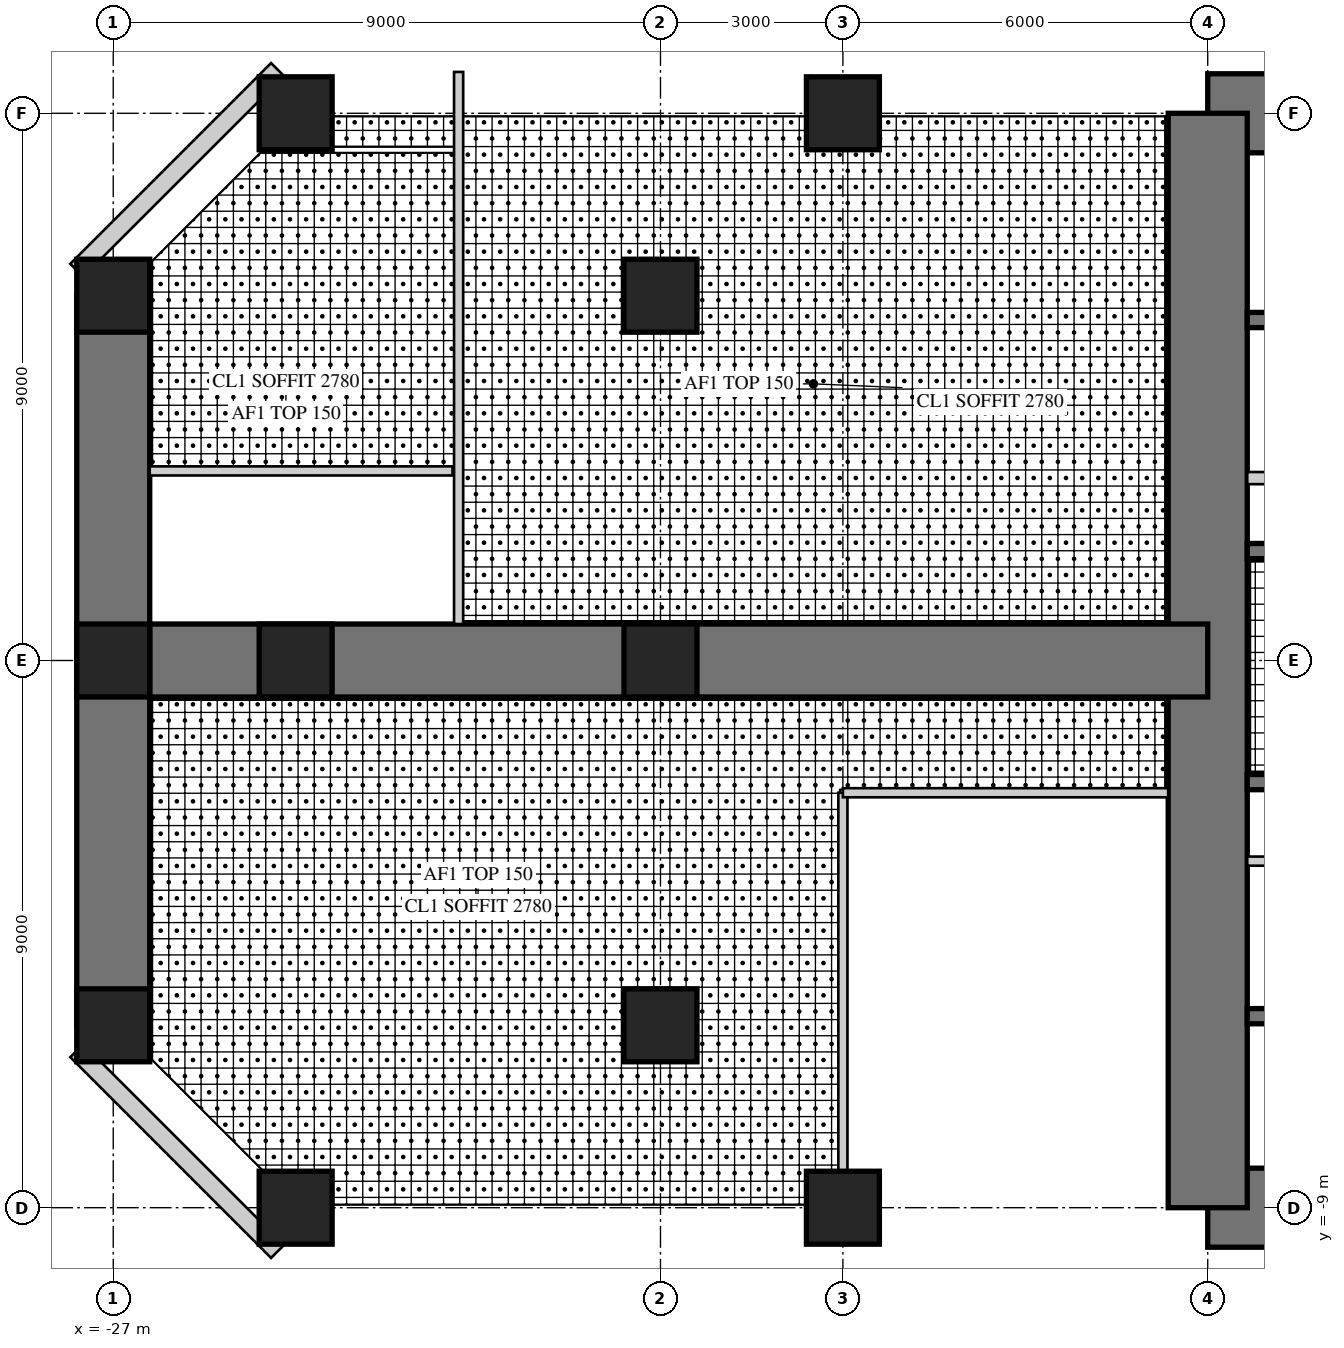
"""IFC4 building model, lengths in metres.
Left out: names, types, materials, properties, quantities, classifications, styles, units other than length and angle.
Written with IfcOpenShell. Run it as: python <this file> out.ifc"""

import sys

from ifc_helpers import new_model, si_unit, direction, frame, frame_2d, origin, origin_2d, place, context, subcontext, project, spatial, rectangle, hollow_rectangle, extrude, element, fill, save


model = new_model("IFC4")
c1 = context("Model", 3, precision=1e-05, world=origin(), true_north=direction((0.0, 1.0)))
c2 = subcontext(c1, "Body", "Model", "MODEL_VIEW")
j1 = project(units=[si_unit("LENGTHUNIT", "METRE"), si_unit("PLANEANGLEUNIT", "RADIAN")], contexts=[c1])
p1 = place(None, origin())
s1 = spatial("IfcSite", under=j1, at=p1, CompositionType="ELEMENT")
p2 = place(p1, origin())
s2 = spatial("IfcBuilding", under=s1, at=p2, CompositionType="ELEMENT")
p3 = place(p2, frame((0.0, 0.0, 71.5)))
s3 = spatial("IfcBuildingStorey", under=s2, at=p3, CompositionType="ELEMENT", Elevation=71.5)
p4 = place(p3, frame((9.0, 9.0, 0.0), z_axis=(0.0, 0.0, 1.0), x_axis=(-1.0, 0.0, 0.0)))
e1 = element("IfcWall", 1, at=p4, inside=s3, PredefinedType="SHEAR", context=c2, shape_type="SweptSolid", body=[
    extrude(rectangle(XDim=18.0, YDim=1.3, at=frame_2d((9.0, 0.0))), origin(), (0.0, 0.0, 1.0), 4.0),
])
p5 = place(p4, frame((9.8, 0.0, 0.0)))
e2 = element("IfcOpeningElement", 2, at=p5, cuts=e1, PredefinedType="OPENING", context=c2, shape_type="SweptSolid", body=[
    extrude(rectangle(XDim=1.0, YDim=2.4, at=frame_2d((0.5, 1.2))), frame((0.0, 0.66, 0.0), z_axis=(0.0, -1.0, 0.0), x_axis=(1.0, 0.0, 0.0)), (0.0, 0.0, 1.0), 1.32),
])
p6 = place(p3, frame((-9.0, -9.0, 0.0), z_axis=(0.0, 0.0, 1.0), x_axis=(1.0, 0.0, 0.0)))
e3 = element("IfcWall", 3, at=p6, inside=s3, PredefinedType="SHEAR", context=c2, shape_type="SweptSolid", body=[
    extrude(rectangle(XDim=18.0, YDim=1.3, at=frame_2d((9.0, 0.0))), origin(), (0.0, 0.0, 1.0), 4.0),
])
p7 = place(p6, frame((9.8, 0.0, 0.0)))
e4 = element("IfcOpeningElement", 4, at=p7, cuts=e3, PredefinedType="OPENING", context=c2, shape_type="SweptSolid", body=[
    extrude(rectangle(XDim=1.0, YDim=2.4, at=frame_2d((0.5, 1.2))), frame((0.0, 0.66, 0.0), z_axis=(0.0, -1.0, 0.0), x_axis=(1.0, 0.0, 0.0)), (0.0, 0.0, 1.0), 1.32),
])
p8 = place(p3, frame((-9.0, 9.0, 0.0), z_axis=(0.0, 0.0, 1.0), x_axis=(0.0, -1.0, 0.0)))
e5 = element("IfcWall", 5, at=p8, inside=s3, PredefinedType="SHEAR", context=c2, shape_type="SweptSolid", body=[
    extrude(rectangle(XDim=18.0, YDim=1.3, at=frame_2d((9.0, 0.0))), origin(), (0.0, 0.0, 1.0), 4.0),
])
p9 = place(p8, frame((9.8, 0.0, 0.0)))
e6 = element("IfcOpeningElement", 6, at=p9, cuts=e5, PredefinedType="OPENING", context=c2, shape_type="SweptSolid", body=[
    extrude(rectangle(XDim=1.0, YDim=2.4, at=frame_2d((0.5, 1.2))), frame((0.0, 0.66, 0.0), z_axis=(0.0, -1.0, 0.0), x_axis=(1.0, 0.0, 0.0)), (0.0, 0.0, 1.0), 1.32),
])
p10 = place(p3, frame((-2.125, 1.8, 0.0), z_axis=(0.0, 0.0, 1.0), x_axis=(-1.0, 0.0, 0.0)))
e7 = element("IfcWall", 7, at=p10, inside=s3, PredefinedType="SHEAR", context=c2, shape_type="SweptSolid", body=[
    extrude(rectangle(XDim=6.225, YDim=0.25, at=frame_2d((3.113, 0.0))), origin(), (0.0, 0.0, 1.0), 4.0),
])
p11 = place(p3, frame((-2.125, 5.6, 0.0), z_axis=(0.0, 0.0, 1.0), x_axis=(-1.0, 0.0, 0.0)))
e8 = element("IfcWall", 8, at=p11, inside=s3, PredefinedType="SHEAR", context=c2, shape_type="SweptSolid", body=[
    extrude(rectangle(XDim=6.225, YDim=0.25, at=frame_2d((3.113, 0.0))), origin(), (0.0, 0.0, 1.0), 4.0),
])
p12 = place(p11, frame((0.175, 0.0, 0.0)))
e9 = element("IfcOpeningElement", 9, at=p12, cuts=e8, PredefinedType="OPENING", context=c2, shape_type="SweptSolid", body=[
    extrude(rectangle(XDim=1.0, YDim=2.1, at=frame_2d((0.5, 1.05))), frame((0.0, 0.135, 0.0), z_axis=(0.0, -1.0, 0.0), x_axis=(1.0, 0.0, 0.0)), (0.0, 0.0, 1.0), 0.27),
])
p13 = place(p3, frame((-5.725, 3.0, 0.0), z_axis=(0.0, 0.0, 1.0), x_axis=(-1.0, 0.0, 0.0)))
e10 = element("IfcWall", 10, at=p13, inside=s3, PredefinedType="PARTITIONING", context=c2, shape_type="SweptSolid", body=[
    extrude(rectangle(XDim=2.625, YDim=0.2, at=frame_2d((1.312, 0.0))), origin(), (0.0, 0.0, 1.0), 4.0),
])
for number, where, z_axis, x_axis in (
    (11, (-1.925, -2.0, 0.0), (0.0, 0.0, 1.0), (-1.0, 0.0, 0.0)),
    (12, (-1.925, -5.85, 0.0), (0.0, 0.0, 1.0), (-1.0, 0.0, 0.0)),
):
    element("IfcWall", number, at=place(p3, frame(where, z_axis=z_axis, x_axis=x_axis)), inside=s3, PredefinedType="SHEAR", context=c2, shape_type="SweptSolid", body=[
        extrude(rectangle(XDim=6.425, YDim=0.25, at=frame_2d((3.212, 0.0))), origin(), (0.0, 0.0, 1.0), 4.0),
    ])
p14 = place(p3, frame((-1.925, -3.3, 0.0), z_axis=(0.0, 0.0, 1.0), x_axis=(-1.0, 0.0, 0.0)))
e13 = element("IfcWall", 13, at=p14, inside=s3, PredefinedType="PARTITIONING", context=c2, shape_type="SweptSolid", body=[
    extrude(rectangle(XDim=6.425, YDim=0.15, at=frame_2d((3.212, 0.0))), origin(), (0.0, 0.0, 1.0), 4.0),
])
p15 = place(p14, frame((0.075, 0.0, 0.0)))
e14 = element("IfcOpeningElement", 14, at=p15, cuts=e13, PredefinedType="OPENING", context=c2, shape_type="SweptSolid", body=[
    extrude(rectangle(XDim=0.8, YDim=2.1, at=frame_2d((0.4, 1.05))), frame((0.0, 0.085, 0.0), z_axis=(0.0, -1.0, 0.0), x_axis=(1.0, 0.0, 0.0)), (0.0, 0.0, 1.0), 0.17),
])
p16 = place(p14, frame((3.675, 0.0, 0.0)))
e15 = element("IfcOpeningElement", 15, at=p16, cuts=e13, PredefinedType="OPENING", context=c2, shape_type="SweptSolid", body=[
    extrude(rectangle(XDim=0.8, YDim=2.1, at=frame_2d((0.4, 1.05))), frame((0.0, 0.085, 0.0), z_axis=(0.0, -1.0, 0.0), x_axis=(1.0, 0.0, 0.0)), (0.0, 0.0, 1.0), 0.17),
])
p17 = place(p3, frame((-9.0, 0.0, 0.0), z_axis=(0.0, 0.0, 1.0), x_axis=(-1.0, 0.0, 0.0)))
e16 = element("IfcWall", 16, at=p17, inside=s3, PredefinedType="SHEAR", context=c2, shape_type="SweptSolid", body=[
    extrude(rectangle(XDim=18.0, YDim=1.2, at=frame_2d((9.0, 0.0))), origin(), (0.0, 0.0, 1.0), 4.0),
])
p18 = place(p17, frame((9.9, 0.0, 0.0)))
e17 = element("IfcOpeningElement", 17, at=p18, cuts=e16, PredefinedType="OPENING", context=c2, shape_type="SweptSolid", body=[
    extrude(rectangle(XDim=1.0, YDim=2.2, at=frame_2d((0.5, 1.1))), frame((0.0, 0.61, 0.0), z_axis=(0.0, -1.0, 0.0), x_axis=(1.0, 0.0, 0.0)), (0.0, 0.0, 1.0), 1.22),
])
p19 = place(p3, frame((-27.0, 6.0, 0.0), z_axis=(0.0, 0.0, 1.0), x_axis=(0.0, -1.0, 0.0)))
e18 = element("IfcWall", 18, at=p19, inside=s3, PredefinedType="SHEAR", context=c2, shape_type="SweptSolid", body=[
    extrude(rectangle(XDim=12.0, YDim=1.2, at=frame_2d((6.0, 0.0))), origin(), (0.0, 0.0, 1.0), 4.0),
])
p20 = place(p19, frame((1.6, 0.0, 0.6)))
e19 = element("IfcOpeningElement", 19, at=p20, cuts=e18, PredefinedType="OPENING", context=c2, shape_type="SweptSolid", body=[
    extrude(rectangle(XDim=3.0, YDim=2.4, at=frame_2d((1.5, 1.2))), frame((0.0, 0.61, 0.0), z_axis=(0.0, -1.0, 0.0), x_axis=(1.0, 0.0, 0.0)), (0.0, 0.0, 1.0), 1.22),
])
p21 = place(p19, frame((7.4, 0.0, 0.6)))
e20 = element("IfcOpeningElement", 20, at=p21, cuts=e18, PredefinedType="OPENING", context=c2, shape_type="SweptSolid", body=[
    extrude(rectangle(XDim=3.0, YDim=2.4, at=frame_2d((1.5, 1.2))), frame((0.0, 0.61, 0.0), z_axis=(0.0, -1.0, 0.0), x_axis=(1.0, 0.0, 0.0)), (0.0, 0.0, 1.0), 1.22),
])
for number, where, z_axis, x_axis in (
    (21, (-15.0, 9.0, 0.0), (0.0, 0.0, 1.0), (1.0, 0.0, 0.0)),
    (22, (-24.0, 9.0, 0.0), (0.0, 0.0, 1.0), (1.0, 0.0, 0.0)),
    (23, (-15.0, -9.0, 0.0), (0.0, 0.0, 1.0), (1.0, 0.0, 0.0)),
    (24, (-24.0, -9.0, 0.0), (0.0, 0.0, 1.0), (1.0, 0.0, 0.0)),
    (25, (-27.0, 6.0, 0.0), (0.0, 0.0, 1.0), (1.0, 0.0, 0.0)),
    (26, (-27.0, 0.0, 0.0), (0.0, 0.0, 1.0), (1.0, 0.0, 0.0)),
    (27, (-27.0, -6.0, 0.0), (0.0, 0.0, 1.0), (1.0, 0.0, 0.0)),
    (28, (-18.0, 6.0, 0.0), (0.0, 0.0, 1.0), (1.0, 0.0, 0.0)),
    (29, (-18.0, 0.0, 0.0), (0.0, 0.0, 1.0), (1.0, 0.0, 0.0)),
    (30, (-18.0, -6.0, 0.0), (0.0, 0.0, 1.0), (1.0, 0.0, 0.0)),
    (31, (-24.0, 0.0, 0.0), (0.0, 0.0, 1.0), (1.0, 0.0, 0.0)),
):
    element("IfcColumn", number, at=place(p3, frame(where, z_axis=z_axis, x_axis=x_axis)), inside=s3, PredefinedType="COLUMN", context=c2, shape_type="SweptSolid", body=[
        extrude(rectangle(XDim=1.2, YDim=1.2, at=origin_2d()), origin(), (0.0, 0.0, 1.0), 4.0),
    ])
p22 = place(p3, frame((-24.298, 9.72, 0.0), z_axis=(0.0, 0.0, 1.0), x_axis=(-0.707106781187, -0.707106781187, 0.0)))
e32 = element("IfcWall", 32, at=p22, inside=s3, PredefinedType="SOLIDWALL", context=c2, shape_type="SweptSolid", body=[
    extrude(rectangle(XDim=4.669, YDim=0.3, at=frame_2d((2.335, 0.0))), origin(), (0.0, 0.0, 1.0), 3.8),
])
p23 = place(p22, frame((1.885, 0.0, 0.3)))
e33 = element("IfcOpeningElement", 33, at=p23, cuts=e32, PredefinedType="OPENING", context=c2, shape_type="SweptSolid", body=[
    extrude(rectangle(XDim=0.9, YDim=2.4, at=frame_2d((0.45, 1.2))), frame((0.0, 0.16, 0.0), z_axis=(0.0, -1.0, 0.0), x_axis=(1.0, 0.0, 0.0)), (0.0, 0.0, 1.0), 0.32),
])
p24 = place(p3, frame((-27.6, -6.418, 0.0), z_axis=(0.0, 0.0, 1.0), x_axis=(0.707106781187, -0.707106781187, 0.0)))
e34 = element("IfcWall", 34, at=p24, inside=s3, PredefinedType="SOLIDWALL", context=c2, shape_type="SweptSolid", body=[
    extrude(rectangle(XDim=4.669, YDim=0.3, at=frame_2d((2.335, 0.0))), origin(), (0.0, 0.0, 1.0), 3.8),
])
p25 = place(p24, frame((1.885, 0.0, 0.3)))
e35 = element("IfcOpeningElement", 35, at=p25, cuts=e34, PredefinedType="OPENING", context=c2, shape_type="SweptSolid", body=[
    extrude(rectangle(XDim=0.9, YDim=2.4, at=frame_2d((0.45, 1.2))), frame((0.0, 0.16, 0.0), z_axis=(0.0, -1.0, 0.0), x_axis=(1.0, 0.0, 0.0)), (0.0, 0.0, 1.0), 0.32),
])
p26 = place(p3, frame((-15.0, -2.175, 0.0), z_axis=(0.0, 0.0, 1.0), x_axis=(0.0, -1.0, 0.0)))
e36 = element("IfcWall", 36, at=p26, inside=s3, PredefinedType="PARTITIONING", context=c2, shape_type="SweptSolid", body=[
    extrude(rectangle(XDim=6.225, YDim=0.15, at=frame_2d((3.112, 0.0))), origin(), (0.0, 0.0, 1.0), 2.95),
])
p27 = place(p26, frame((2.613, 0.0, 0.0)))
e37 = element("IfcOpeningElement", 37, at=p27, cuts=e36, PredefinedType="OPENING", context=c2, shape_type="SweptSolid", body=[
    extrude(rectangle(XDim=1.0, YDim=2.1, at=frame_2d((0.5, 1.05))), frame((0.0, 0.085, 0.0), z_axis=(0.0, -1.0, 0.0), x_axis=(1.0, 0.0, 0.0)), (0.0, 0.0, 1.0), 0.17),
])
p28 = place(p3, frame((-9.65, -2.175, 0.0), z_axis=(0.0, 0.0, 1.0), x_axis=(-1.0, 0.0, 0.0)))
e38 = element("IfcWall", 38, at=p28, inside=s3, PredefinedType="PARTITIONING", context=c2, shape_type="SweptSolid", body=[
    extrude(rectangle(XDim=5.35, YDim=0.15, at=frame_2d((2.675, 0.0))), origin(), (0.0, 0.0, 1.0), 3.8),
])
p29 = place(p3, frame((-21.42, 3.118, 0.0), z_axis=(0.0, 0.0, 1.0), x_axis=(-1.0, 0.0, 0.0)))
e39 = element("IfcWall", 39, at=p29, inside=s3, PredefinedType="PARTITIONING", context=c2, shape_type="SweptSolid", body=[
    extrude(rectangle(XDim=4.98, YDim=0.15, at=frame_2d((2.49, 0.0))), origin(), (0.0, 0.0, 1.0), 3.8),
])
p30 = place(p3, frame((-21.32, 9.68, 0.0), z_axis=(0.0, 0.0, 1.0), x_axis=(0.0, -1.0, 0.0)))
e40 = element("IfcWall", 40, at=p30, inside=s3, PredefinedType="PARTITIONING", context=c2, shape_type="SweptSolid", body=[
    extrude(rectangle(XDim=9.08, YDim=0.15, at=frame_2d((4.54, 0.0))), origin(), (0.0, 0.0, 1.0), 3.8),
])
p31 = place(p30, frame((5.087, 0.0, 0.0)))
e41 = element("IfcOpeningElement", 41, at=p31, cuts=e40, PredefinedType="OPENING", context=c2, shape_type="SweptSolid", body=[
    extrude(rectangle(XDim=1.0, YDim=2.2, at=frame_2d((0.5, 1.1))), frame((0.0, 0.085, 0.0), z_axis=(0.0, -1.0, 0.0), x_axis=(1.0, 0.0, 0.0)), (0.0, 0.0, 1.0), 0.17),
])
p32 = place(p30, frame((7.73, 0.0, 0.0)))
e42 = element("IfcOpeningElement", 42, at=p32, cuts=e40, PredefinedType="OPENING", context=c2, shape_type="SweptSolid", body=[
    extrude(rectangle(XDim=1.0, YDim=2.2, at=frame_2d((0.5, 1.1))), frame((0.0, 0.085, 0.0), z_axis=(0.0, -1.0, 0.0), x_axis=(1.0, 0.0, 0.0)), (0.0, 0.0, 1.0), 0.17),
])
p33 = place(p23, origin())
e43 = element("IfcWindow", 43, at=p33, inside=s3, PartitioningType="SINGLE_PANEL", PredefinedType="WINDOW", context=c2, shape_type="SweptSolid", body=[
    extrude(hollow_rectangle(XDim=0.9, YDim=2.4, WallThickness=0.06, at=frame_2d((0.45, 1.2))), frame((0.0, 0.03, 0.0), z_axis=(0.0, -1.0, 0.0), x_axis=(1.0, 0.0, 0.0)), (0.0, 0.0, 1.0), 0.06),
    extrude(rectangle(XDim=0.779, YDim=2.279, at=frame_2d((0.45, 1.2))), frame((0.0, 0.03, 0.0), z_axis=(0.0, -1.0, 0.0), x_axis=(1.0, 0.0, 0.0)), (0.0, 0.0, 1.0), 0.06),
])
fill(e33, e43)
p34 = place(p20, origin())
e44 = element("IfcWindow", 44, at=p34, inside=s3, PartitioningType="SINGLE_PANEL", PredefinedType="WINDOW", context=c2, shape_type="SweptSolid", body=[
    extrude(hollow_rectangle(XDim=3.0, YDim=2.4, WallThickness=0.06, at=frame_2d((1.5, 1.2))), frame((0.0, 0.03, 0.0), z_axis=(0.0, -1.0, 0.0), x_axis=(1.0, 0.0, 0.0)), (0.0, 0.0, 1.0), 0.06),
    extrude(rectangle(XDim=2.879, YDim=2.279, at=frame_2d((1.5, 1.2))), frame((0.0, 0.03, 0.0), z_axis=(0.0, -1.0, 0.0), x_axis=(1.0, 0.0, 0.0)), (0.0, 0.0, 1.0), 0.06),
])
fill(e19, e44)
p35 = place(p21, origin())
e45 = element("IfcWindow", 45, at=p35, inside=s3, PartitioningType="SINGLE_PANEL", PredefinedType="WINDOW", context=c2, shape_type="SweptSolid", body=[
    extrude(hollow_rectangle(XDim=3.0, YDim=2.4, WallThickness=0.06, at=frame_2d((1.5, 1.2))), frame((0.0, 0.03, 0.0), z_axis=(0.0, -1.0, 0.0), x_axis=(1.0, 0.0, 0.0)), (0.0, 0.0, 1.0), 0.06),
    extrude(rectangle(XDim=2.879, YDim=2.279, at=frame_2d((1.5, 1.2))), frame((0.0, 0.03, 0.0), z_axis=(0.0, -1.0, 0.0), x_axis=(1.0, 0.0, 0.0)), (0.0, 0.0, 1.0), 0.06),
])
fill(e20, e45)
p36 = place(p25, origin())
e46 = element("IfcWindow", 46, at=p36, inside=s3, PartitioningType="SINGLE_PANEL", PredefinedType="WINDOW", context=c2, shape_type="SweptSolid", body=[
    extrude(hollow_rectangle(XDim=0.9, YDim=2.4, WallThickness=0.06, at=frame_2d((0.45, 1.2))), frame((0.0, 0.03, 0.0), z_axis=(0.0, -1.0, 0.0), x_axis=(1.0, 0.0, 0.0)), (0.0, 0.0, 1.0), 0.06),
    extrude(rectangle(XDim=0.779, YDim=2.279, at=frame_2d((0.45, 1.2))), frame((0.0, 0.03, 0.0), z_axis=(0.0, -1.0, 0.0), x_axis=(1.0, 0.0, 0.0)), (0.0, 0.0, 1.0), 0.06),
])
fill(e35, e46)
p37 = place(p27, origin())
e47 = element("IfcDoor", 47, at=p37, inside=s3, OperationType="SINGLE_SWING_LEFT", PredefinedType="DOOR", context=c2, shape_type="SweptSolid", body=[
    extrude(rectangle(XDim=1.0, YDim=2.1, at=frame_2d((0.5, 1.05))), frame((0.0, 0.025, 0.0), z_axis=(0.0, -1.0, 0.0), x_axis=(1.0, 0.0, 0.0)), (0.0, 0.0, 1.0), 0.05),
])
fill(e37, e47)
p38 = place(p31, frame((1.0, 0.0, 0.0), z_axis=(0.0, 0.0, 1.0), x_axis=(-1.0, 0.0, 0.0)))
e48 = element("IfcDoor", 48, at=p38, inside=s3, OperationType="SINGLE_SWING_LEFT", PredefinedType="DOOR", context=c2, shape_type="SweptSolid", body=[
    extrude(rectangle(XDim=1.0, YDim=2.2, at=frame_2d((0.5, 1.1))), frame((0.0, 0.025, 0.0), z_axis=(0.0, -1.0, 0.0), x_axis=(1.0, 0.0, 0.0)), (0.0, 0.0, 1.0), 0.05),
])
fill(e41, e48)
p39 = place(p32, frame((1.0, 0.0, 0.0), z_axis=(0.0, 0.0, 1.0), x_axis=(-1.0, 0.0, 0.0)))
e49 = element("IfcDoor", 49, at=p39, inside=s3, OperationType="SINGLE_SWING_LEFT", PredefinedType="DOOR", context=c2, shape_type="SweptSolid", body=[
    extrude(rectangle(XDim=1.0, YDim=2.2, at=frame_2d((0.5, 1.1))), frame((0.0, 0.025, 0.0), z_axis=(0.0, -1.0, 0.0), x_axis=(1.0, 0.0, 0.0)), (0.0, 0.0, 1.0), 0.05),
])
fill(e42, e49)
p40 = place(p18, frame((1.0, 0.0, 0.0), z_axis=(0.0, 0.0, 1.0), x_axis=(-1.0, 0.0, 0.0)))
e50 = element("IfcDoor", 50, at=p40, inside=s3, OperationType="SINGLE_SWING_LEFT", PredefinedType="DOOR", context=c2, shape_type="SweptSolid", body=[
    extrude(rectangle(XDim=1.0, YDim=2.2, at=frame_2d((0.5, 1.1))), frame((0.0, 0.025, 0.0), z_axis=(0.0, -1.0, 0.0), x_axis=(1.0, 0.0, 0.0)), (0.0, 0.0, 1.0), 0.05),
])
fill(e17, e50)
p41 = place(p9, frame((1.0, 0.0, 0.0), z_axis=(0.0, 0.0, 1.0), x_axis=(-1.0, 0.0, 0.0)))
e51 = element("IfcDoor", 51, at=p41, inside=s3, OperationType="SINGLE_SWING_RIGHT", PredefinedType="DOOR", context=c2, shape_type="SweptSolid", body=[
    extrude(rectangle(XDim=1.0, YDim=2.4, at=frame_2d((0.5, 1.2))), frame((0.0, -0.005, 0.0), z_axis=(0.0, -1.0, 0.0), x_axis=(1.0, 0.0, 0.0)), (0.0, 0.0, 1.0), 0.05),
])
fill(e6, e51)
save(model, sys.argv[1])
